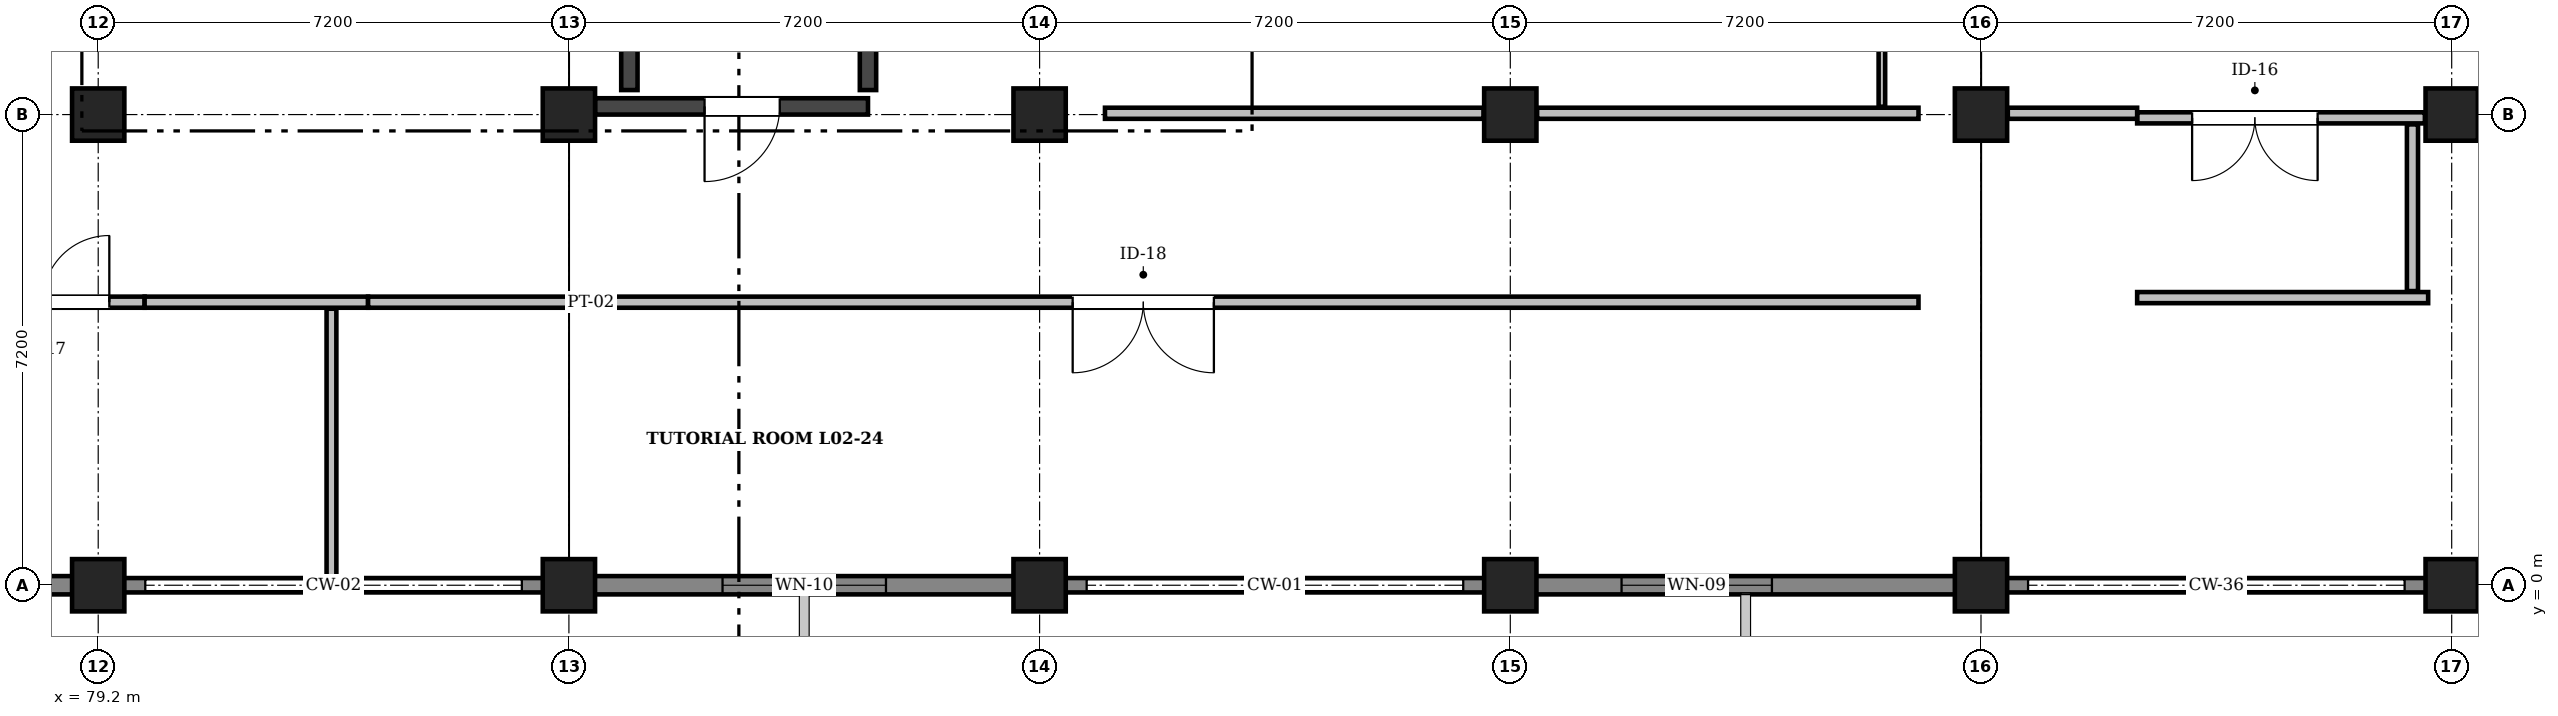
"""IFC4 building model, lengths in metres.
Left out: names, types, materials, properties, quantities, classifications, styles, units other than length and angle.
Written with IfcOpenShell. Run it as: python <this file> out.ifc"""

import sys

from ifc_helpers import new_model, si_unit, direction, frame, frame_2d, origin, origin_2d, place, context, subcontext, project, spatial, rectangle, extrude, element, fill, save


model = new_model("IFC4")
c1 = context("Model", 3, precision=1e-05, world=origin(), true_north=direction((0.0, 1.0)))
c2 = subcontext(c1, "Body", "Model", "MODEL_VIEW")
j1 = project(units=[si_unit("LENGTHUNIT", "METRE"), si_unit("PLANEANGLEUNIT", "RADIAN")], contexts=[c1])
p1 = place(None, origin())
s1 = spatial("IfcSite", under=j1, at=p1, CompositionType="ELEMENT")
p2 = place(p1, origin())
s2 = spatial("IfcBuilding", under=s1, at=p2, CompositionType="ELEMENT")
p3 = place(p2, frame((0.0, 0.0, 9.6)))
s3 = spatial("IfcBuildingStorey", under=s2, at=p3, CompositionType="ELEMENT", Elevation=9.6)
for number, where, z_axis, x_axis in (
    (1, (79.2, 0.0, 0.0), (0.0, 0.0, 1.0), (1.0, 0.0, 0.0)),
    (2, (79.2, 7.2, 0.0), (0.0, 0.0, 1.0), (1.0, 0.0, 0.0)),
    (3, (86.4, 0.0, 0.0), (0.0, 0.0, 1.0), (1.0, 0.0, 0.0)),
    (4, (86.4, 7.2, 0.0), (0.0, 0.0, 1.0), (1.0, 0.0, 0.0)),
    (5, (93.6, 0.0, 0.0), (0.0, 0.0, 1.0), (1.0, 0.0, 0.0)),
    (6, (93.6, 7.2, 0.0), (0.0, 0.0, 1.0), (1.0, 0.0, 0.0)),
    (7, (100.8, 0.0, 0.0), (0.0, 0.0, 1.0), (1.0, 0.0, 0.0)),
    (8, (100.8, 7.2, 0.0), (0.0, 0.0, 1.0), (1.0, 0.0, 0.0)),
    (9, (108.0, 0.0, 0.0), (0.0, 0.0, 1.0), (1.0, 0.0, 0.0)),
    (10, (108.0, 7.2, 0.0), (0.0, 0.0, 1.0), (1.0, 0.0, 0.0)),
    (11, (115.2, 0.0, 0.0), (0.0, 0.0, 1.0), (1.0, 0.0, 0.0)),
    (12, (115.2, 7.2, 0.0), (0.0, 0.0, 1.0), (1.0, 0.0, 0.0)),
):
    element("IfcColumn", number, at=place(p3, frame(where, z_axis=z_axis, x_axis=x_axis)), inside=s3, PredefinedType="COLUMN", context=c2, shape_type="SweptSolid", body=[
        extrude(rectangle(XDim=0.8, YDim=0.8, at=origin_2d()), origin(), (0.0, 0.0, 1.0), 4.8),
    ])
p4 = place(p3, frame((122.4, 0.0, 0.0), z_axis=(0.0, 0.0, 1.0), x_axis=(-1.0, 0.0, 0.0)))
e13 = element("IfcWall", 13, at=p4, inside=s3, PredefinedType="SOLIDWALL", context=c2, shape_type="SweptSolid", body=[
    extrude(rectangle(XDim=7.2, YDim=0.28, at=frame_2d((3.6, 0.0))), origin(), (0.0, 0.0, 1.0), 4.52),
])
p5 = place(p4, frame((2.55, 0.0, 0.95)))
e14 = element("IfcOpeningElement", 14, at=p5, cuts=e13, PredefinedType="OPENING", context=c2, shape_type="SweptSolid", body=[
    extrude(rectangle(XDim=2.1, YDim=1.3, at=frame_2d((1.05, 0.65))), frame((0.0, 0.152, 0.0), z_axis=(0.0, -1.0, 0.0), x_axis=(1.0, 0.0, 0.0)), (0.0, 0.0, 1.0), 0.304),
])
p6 = place(p3, frame((115.2, 0.0, 0.0), z_axis=(0.0, 0.0, 1.0), x_axis=(-1.0, 0.0, 0.0)))
e15 = element("IfcWall", 15, at=p6, inside=s3, PredefinedType="SOLIDWALL", context=c2, shape_type="SweptSolid", body=[
    extrude(rectangle(XDim=7.2, YDim=0.22, at=frame_2d((3.6, 0.0))), origin(), (0.0, 0.0, 1.0), 1.24),
])
p7 = place(p3, frame((108.0, 0.0, 0.0), z_axis=(0.0, 0.0, 1.0), x_axis=(-1.0, 0.0, 0.0)))
e16 = element("IfcWall", 16, at=p7, inside=s3, PredefinedType="SOLIDWALL", context=c2, shape_type="SweptSolid", body=[
    extrude(rectangle(XDim=7.2, YDim=0.28, at=frame_2d((3.6, 0.0))), origin(), (0.0, 0.0, 1.0), 4.52),
])
p8 = place(p7, frame((3.198, 0.0, 0.95)))
e17 = element("IfcOpeningElement", 17, at=p8, cuts=e16, PredefinedType="OPENING", context=c2, shape_type="SweptSolid", body=[
    extrude(rectangle(XDim=2.3, YDim=1.3, at=frame_2d((1.15, 0.65))), frame((0.0, 0.152, 0.0), z_axis=(0.0, -1.0, 0.0), x_axis=(1.0, 0.0, 0.0)), (0.0, 0.0, 1.0), 0.304),
])
p9 = place(p3, frame((100.8, 0.0, 0.0), z_axis=(0.0, 0.0, 1.0), x_axis=(-1.0, 0.0, 0.0)))
e18 = element("IfcWall", 18, at=p9, inside=s3, PredefinedType="SOLIDWALL", context=c2, shape_type="SweptSolid", body=[
    extrude(rectangle(XDim=7.2, YDim=0.22, at=frame_2d((3.6, 0.0))), origin(), (0.0, 0.0, 1.0), 1.24),
])
p10 = place(p3, frame((93.6, 0.0, 0.0), z_axis=(0.0, 0.0, 1.0), x_axis=(-1.0, 0.0, 0.0)))
e19 = element("IfcWall", 19, at=p10, inside=s3, PredefinedType="SOLIDWALL", context=c2, shape_type="SweptSolid", body=[
    extrude(rectangle(XDim=7.2, YDim=0.28, at=frame_2d((3.6, 0.0))), origin(), (0.0, 0.0, 1.0), 4.52),
])
p11 = place(p10, frame((2.35, 0.0, 0.95)))
e20 = element("IfcOpeningElement", 20, at=p11, cuts=e19, PredefinedType="OPENING", context=c2, shape_type="SweptSolid", body=[
    extrude(rectangle(XDim=2.5, YDim=1.3, at=frame_2d((1.25, 0.65))), frame((0.0, 0.152, 0.0), z_axis=(0.0, -1.0, 0.0), x_axis=(1.0, 0.0, 0.0)), (0.0, 0.0, 1.0), 0.304),
])
p12 = place(p3, frame((86.4, 0.0, 0.0), z_axis=(0.0, 0.0, 1.0), x_axis=(-1.0, 0.0, 0.0)))
e21 = element("IfcWall", 21, at=p12, inside=s3, PredefinedType="SOLIDWALL", context=c2, shape_type="SweptSolid", body=[
    extrude(rectangle(XDim=7.2, YDim=0.22, at=frame_2d((3.6, 0.0))), origin(), (0.0, 0.0, 1.0), 1.24),
])
p13 = place(p3, frame((79.2, 0.0, 0.0), z_axis=(0.0, 0.0, 1.0), x_axis=(-1.0, 0.0, 0.0)))
e22 = element("IfcWall", 22, at=p13, inside=s3, PredefinedType="SOLIDWALL", context=c2, shape_type="SweptSolid", body=[
    extrude(rectangle(XDim=7.2, YDim=0.28, at=frame_2d((3.6, 0.0))), origin(), (0.0, 0.0, 1.0), 4.52),
])
p14 = place(p13, frame((2.25, 0.0, 0.95)))
e23 = element("IfcOpeningElement", 23, at=p14, cuts=e22, PredefinedType="OPENING", context=c2, shape_type="SweptSolid", body=[
    extrude(rectangle(XDim=2.7, YDim=1.3, at=frame_2d((1.35, 0.65))), frame((0.0, 0.152, 0.0), z_axis=(0.0, -1.0, 0.0), x_axis=(1.0, 0.0, 0.0)), (0.0, 0.0, 1.0), 0.304),
])
p15 = place(p3, frame((86.8, 7.325, 0.0), z_axis=(0.0, 0.0, 1.0), x_axis=(1.0, 0.0, 0.0)))
e24 = element("IfcWall", 24, at=p15, inside=s3, PredefinedType="SHEAR", context=c2, shape_type="SweptSolid", body=[
    extrude(rectangle(XDim=4.175, YDim=0.25, at=frame_2d((2.087, 0.0))), origin(), (0.0, 0.0, 1.0), 4.55),
])
p16 = place(p15, frame((1.675, 0.0, 0.0)))
e25 = element("IfcOpeningElement", 25, at=p16, cuts=e24, PredefinedType="OPENING", context=c2, shape_type="SweptSolid", body=[
    extrude(rectangle(XDim=1.15, YDim=2.15, at=frame_2d((0.575, 1.075))), frame((0.0, 0.137, 0.0), z_axis=(0.0, -1.0, 0.0), x_axis=(1.0, 0.0, 0.0)), (0.0, 0.0, 1.0), 0.274),
])
p17 = place(p3, frame((87.325, 7.575, 0.0), z_axis=(0.0, 0.0, 1.0), x_axis=(0.0, 1.0, 0.0)))
e26 = element("IfcWall", 26, at=p17, inside=s3, PredefinedType="SHEAR", context=c2, shape_type="SweptSolid", body=[
    extrude(rectangle(XDim=2.77, YDim=0.25, at=frame_2d((1.385, 0.0))), origin(), (0.0, 0.0, 1.0), 4.55),
])
p18 = place(p3, frame((90.975, 7.575, 0.0), z_axis=(0.0, 0.0, 1.0), x_axis=(0.0, 1.0, 0.0)))
e27 = element("IfcWall", 27, at=p18, inside=s3, PredefinedType="SHEAR", context=c2, shape_type="SweptSolid", body=[
    extrude(rectangle(XDim=3.225, YDim=0.25, at=frame_2d((1.613, 0.0))), origin(), (0.0, 0.0, 1.0), 4.55),
])
p19 = place(p3, frame((76.79, 4.33, 0.0), z_axis=(0.0, 0.0, 1.0), x_axis=(1.0, 0.0, 0.0)))
e28 = element("IfcWall", 28, at=p19, inside=s3, PredefinedType="PARTITIONING", context=c2, shape_type="SweptSolid", body=[
    extrude(rectangle(XDim=3.12, YDim=0.17, at=frame_2d((1.56, 0.0))), origin(), (0.0, 0.0, 1.0), 4.46),
])
p20 = place(p19, frame((0.54, 0.0, 0.0)))
e29 = element("IfcOpeningElement", 29, at=p20, cuts=e28, PredefinedType="OPENING", context=c2, shape_type="SweptSolid", body=[
    extrude(rectangle(XDim=2.04, YDim=2.34, at=frame_2d((1.02, 1.17))), frame((0.0, 0.097, 0.0), z_axis=(0.0, -1.0, 0.0), x_axis=(1.0, 0.0, 0.0)), (0.0, 0.0, 1.0), 0.194),
])
p21 = place(p3, frame((79.91, 4.33, 0.0), z_axis=(0.0, 0.0, 1.0), x_axis=(1.0, 0.0, 0.0)))
e30 = element("IfcWall", 30, at=p21, inside=s3, PredefinedType="PARTITIONING", context=c2, shape_type="SweptSolid", body=[
    extrude(rectangle(XDim=3.418, YDim=0.17, at=frame_2d((1.709, 0.0))), origin(), (0.0, 0.0, 1.0), 4.46),
])
p22 = place(p3, frame((101.21, 7.22, 0.0), z_axis=(0.0, 0.0, 1.0), x_axis=(1.0, 0.0, 0.0)))
e31 = element("IfcWall", 31, at=p22, inside=s3, PredefinedType="PARTITIONING", context=c2, shape_type="SweptSolid", body=[
    extrude(rectangle(XDim=5.834, YDim=0.17, at=frame_2d((2.917, 0.0))), origin(), (0.0, 0.0, 1.0), 3.93),
])
p23 = place(p3, frame((94.6, 7.22, 0.0), z_axis=(0.0, 0.0, 1.0), x_axis=(1.0, 0.0, 0.0)))
e32 = element("IfcWall", 32, at=p23, inside=s3, PredefinedType="PARTITIONING", context=c2, shape_type="SweptSolid", body=[
    extrude(rectangle(XDim=5.79, YDim=0.17, at=frame_2d((2.895, 0.0))), origin(), (0.0, 0.0, 1.0), 3.93),
])
p24 = place(p3, frame((83.328, 4.33, 0.0), z_axis=(0.0, 0.0, 1.0), x_axis=(1.0, 0.0, 0.0)))
e33 = element("IfcWall", 33, at=p24, inside=s3, PredefinedType="PARTITIONING", context=c2, shape_type="SweptSolid", body=[
    extrude(rectangle(XDim=23.716, YDim=0.17, at=frame_2d((11.858, 0.0))), origin(), (0.0, 0.0, 1.0), 4.46),
])
p25 = place(p24, frame((10.778, 0.0, 0.0)))
e34 = element("IfcOpeningElement", 34, at=p25, cuts=e33, PredefinedType="OPENING", context=c2, shape_type="SweptSolid", body=[
    extrude(rectangle(XDim=2.16, YDim=2.35, at=frame_2d((1.08, 1.175))), frame((0.0, 0.097, 0.0), z_axis=(0.0, -1.0, 0.0), x_axis=(1.0, 0.0, 0.0)), (0.0, 0.0, 1.0), 0.194),
])
p26 = place(p3, frame((110.388, 4.4, 0.0), z_axis=(0.0, 0.0, 1.0), x_axis=(1.0, 0.0, 0.0)))
e35 = element("IfcWall", 35, at=p26, inside=s3, PredefinedType="PARTITIONING", context=c2, shape_type="SweptSolid", body=[
    extrude(rectangle(XDim=4.452, YDim=0.17, at=frame_2d((2.226, 0.0))), origin(), (0.0, 0.0, 1.0), 4.46),
])
p27 = place(p3, frame((110.388, 7.15, 0.0), z_axis=(0.0, 0.0, 1.0), x_axis=(1.0, 0.0, 0.0)))
e36 = element("IfcWall", 36, at=p27, inside=s3, PredefinedType="PARTITIONING", context=c2, shape_type="SweptSolid", body=[
    extrude(rectangle(XDim=4.402, YDim=0.17, at=frame_2d((2.201, 0.0))), origin(), (0.0, 0.0, 1.0), 3.93),
])
p28 = place(p27, frame((0.841, 0.0, 0.0)))
e37 = element("IfcOpeningElement", 37, at=p28, cuts=e36, PredefinedType="OPENING", context=c2, shape_type="SweptSolid", body=[
    extrude(rectangle(XDim=1.92, YDim=2.32, at=frame_2d((0.96, 1.16))), frame((0.0, 0.097, 0.0), z_axis=(0.0, -1.0, 0.0), x_axis=(1.0, 0.0, 0.0)), (0.0, 0.0, 1.0), 0.194),
])
p29 = place(p3, frame((114.6, 4.5, 0.0), z_axis=(0.0, 0.0, 1.0), x_axis=(0.0, 1.0, 0.0)))
e38 = element("IfcWall", 38, at=p29, inside=s3, PredefinedType="PARTITIONING", context=c2, shape_type="SweptSolid", body=[
    extrude(rectangle(XDim=2.55, YDim=0.17, at=frame_2d((1.275, 0.0))), origin(), (0.0, 0.0, 1.0), 4.46),
])
p30 = place(p3, frame((108.41, 7.22, 0.0), z_axis=(0.0, 0.0, 1.0), x_axis=(1.0, 0.0, 0.0)))
e39 = element("IfcWall", 39, at=p30, inside=s3, PredefinedType="PARTITIONING", context=c2, shape_type="SweptSolid", body=[
    extrude(rectangle(XDim=1.979, YDim=0.17, at=frame_2d((0.989, 0.0))), origin(), (0.0, 0.0, 1.0), 3.93),
])
p31 = place(p3, frame((82.768, 0.122, 0.0), z_axis=(0.0, 0.0, 1.0), x_axis=(0.0, 1.0, 0.0)))
e40 = element("IfcWall", 40, at=p31, inside=s3, PredefinedType="PARTITIONING", context=c2, shape_type="SweptSolid", body=[
    extrude(rectangle(XDim=4.108, YDim=0.15, at=frame_2d((2.054, 0.0))), origin(), (0.0, 0.0, 1.0), 4.46),
])
p32 = place(p3, frame((106.484, 7.32, 0.0), z_axis=(0.0, 0.0, 1.0), x_axis=(0.0, 1.0, 0.0)))
e41 = element("IfcWall", 41, at=p32, inside=s3, PredefinedType="PARTITIONING", context=c2, shape_type="SweptSolid", body=[
    extrude(rectangle(XDim=7.11, YDim=0.1, at=frame_2d((3.555, 0.0))), origin(), (0.0, 0.0, 1.0), 4.46),
])
p33 = place(p32, frame((2.815, 0.0, 0.0)))
e42 = element("IfcOpeningElement", 42, at=p33, cuts=e41, PredefinedType="OPENING", context=c2, shape_type="SweptSolid", body=[
    extrude(rectangle(XDim=1.48, YDim=2.26, at=frame_2d((0.74, 1.13))), frame((0.0, 0.062, 0.0), z_axis=(0.0, -1.0, 0.0), x_axis=(1.0, 0.0, 0.0)), (0.0, 0.0, 1.0), 0.124),
])
p34 = place(p8, origin())
e43 = element("IfcWindow", 43, at=p34, inside=s3, PartitioningType="SINGLE_PANEL", PredefinedType="WINDOW", context=c2, shape_type="SweptSolid", body=[
    extrude(rectangle(XDim=2.3, YDim=1.3, at=frame_2d((1.15, 0.65))), frame((0.0, 0.03, 0.0), z_axis=(0.0, -1.0, 0.0), x_axis=(1.0, 0.0, 0.0)), (0.0, 0.0, 1.0), 0.06),
])
fill(e17, e43)
p35 = place(p11, origin())
e44 = element("IfcWindow", 44, at=p35, inside=s3, PartitioningType="SINGLE_PANEL", PredefinedType="WINDOW", context=c2, shape_type="SweptSolid", body=[
    extrude(rectangle(XDim=2.5, YDim=1.3, at=frame_2d((1.25, 0.65))), frame((0.0, 0.03, 0.0), z_axis=(0.0, -1.0, 0.0), x_axis=(1.0, 0.0, 0.0)), (0.0, 0.0, 1.0), 0.06),
])
fill(e20, e44)
p36 = place(p16, frame((1.15, 0.0, 0.0), z_axis=(0.0, 0.0, 1.0), x_axis=(-1.0, 0.0, 0.0)))
e45 = element("IfcDoor", 45, at=p36, inside=s3, OperationType="SINGLE_SWING_RIGHT", PredefinedType="DOOR", context=c2, shape_type="SweptSolid", body=[
    extrude(rectangle(XDim=1.15, YDim=2.15, at=frame_2d((0.575, 1.075))), frame((0.0, 0.025, 0.0), z_axis=(0.0, -1.0, 0.0), x_axis=(1.0, 0.0, 0.0)), (0.0, 0.0, 1.0), 0.05),
])
fill(e25, e45)
p37 = place(p28, frame((1.92, 0.0, 0.0), z_axis=(0.0, 0.0, 1.0), x_axis=(-1.0, 0.0, 0.0)))
e46 = element("IfcDoor", 46, at=p37, inside=s3, OperationType="DOUBLE_DOOR_SINGLE_SWING", PredefinedType="DOOR", context=c2, shape_type="SweptSolid", body=[
    extrude(rectangle(XDim=1.92, YDim=2.32, at=frame_2d((0.96, 1.16))), frame((0.0, 0.025, 0.0), z_axis=(0.0, -1.0, 0.0), x_axis=(1.0, 0.0, 0.0)), (0.0, 0.0, 1.0), 0.05),
])
fill(e37, e46)
p38 = place(p20, origin())
e47 = element("IfcDoor", 47, at=p38, inside=s3, OperationType="DOUBLE_DOOR_SINGLE_SWING", PredefinedType="DOOR", context=c2, shape_type="SweptSolid", body=[
    extrude(rectangle(XDim=2.04, YDim=2.34, at=frame_2d((1.02, 1.17))), frame((0.0, 0.025, 0.0), z_axis=(0.0, -1.0, 0.0), x_axis=(1.0, 0.0, 0.0)), (0.0, 0.0, 1.0), 0.05),
])
fill(e29, e47)
p39 = place(p25, frame((2.16, 0.0, 0.0), z_axis=(0.0, 0.0, 1.0), x_axis=(-1.0, 0.0, 0.0)))
e48 = element("IfcDoor", 48, at=p39, inside=s3, OperationType="DOUBLE_DOOR_SINGLE_SWING", PredefinedType="DOOR", context=c2, shape_type="SweptSolid", body=[
    extrude(rectangle(XDim=2.16, YDim=2.35, at=frame_2d((1.08, 1.175))), frame((0.0, 0.025, 0.0), z_axis=(0.0, -1.0, 0.0), x_axis=(1.0, 0.0, 0.0)), (0.0, 0.0, 1.0), 0.05),
])
fill(e34, e48)
save(model, sys.argv[1])
